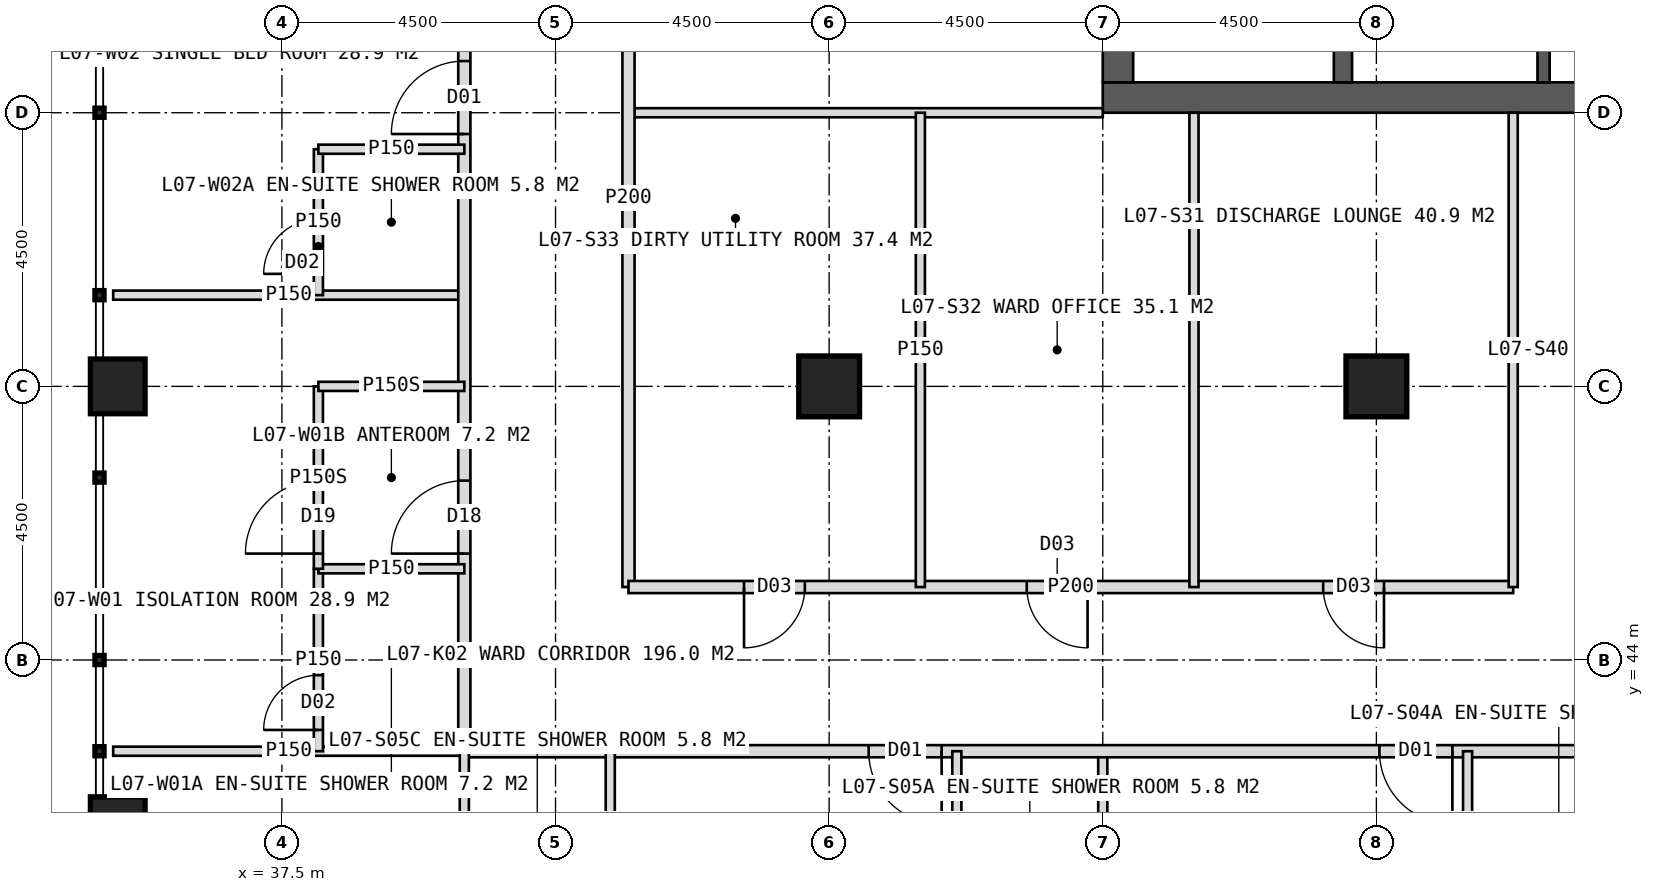
"""IFC4 building model, lengths in metres.
Left out: names, types, materials, properties, quantities, classifications, styles, units other than length and angle.
Written with IfcOpenShell. Run it as: python <this file> out.ifc"""

import sys

from ifc_helpers import new_model, si_unit, direction, frame, frame_2d, origin, origin_2d, place, context, subcontext, project, spatial, rectangle, hollow_rectangle, extrude, element, fill, save


model = new_model("IFC4")
c1 = context("Model", 3, precision=1e-05, world=origin(), true_north=direction((0.0, 1.0)))
c2 = subcontext(c1, "Body", "Model", "MODEL_VIEW")
j1 = project(units=[si_unit("LENGTHUNIT", "METRE"), si_unit("PLANEANGLEUNIT", "RADIAN")], contexts=[c1])
p1 = place(None, origin())
s1 = spatial("IfcSite", under=j1, at=p1, CompositionType="ELEMENT")
p2 = place(p1, origin())
s2 = spatial("IfcBuilding", under=s1, at=p2, CompositionType="ELEMENT")
p3 = place(p2, frame((0.0, 0.0, 35.0)))
s3 = spatial("IfcBuildingStorey", under=s2, at=p3, CompositionType="ELEMENT", Elevation=35.0)
p4 = place(p3, frame((51.0, 53.25, 0.0), z_axis=(0.0, 0.0, 1.0), x_axis=(1.0, 0.0, 0.0)))
e1 = element("IfcWall", 1, at=p4, inside=s3, PredefinedType="SHEAR", context=c2, shape_type="SweptSolid", body=[
    extrude(rectangle(XDim=18.0, YDim=0.5, at=frame_2d((9.0, 0.0))), origin(), (0.0, 0.0, 1.0), 4.0),
])
p5 = place(p4, frame((8.1, 0.0, 0.0)))
e2 = element("IfcOpeningElement", 2, at=p5, cuts=e1, PredefinedType="OPENING", context=c2, shape_type="SweptSolid", body=[
    extrude(rectangle(XDim=1.8, YDim=2.2, at=frame_2d((0.9, 1.1))), frame((0.0, 0.26, 0.0), z_axis=(0.0, -1.0, 0.0), x_axis=(1.0, 0.0, 0.0)), (0.0, 0.0, 1.0), 0.52),
])
p6 = place(p3, frame((51.25, 53.5, 0.0), z_axis=(0.0, 0.0, 1.0), x_axis=(0.0, 1.0, 0.0)))
e3 = element("IfcWall", 3, at=p6, inside=s3, PredefinedType="SHEAR", context=c2, shape_type="SweptSolid", body=[
    extrude(rectangle(XDim=17.0, YDim=0.5, at=frame_2d((8.5, 0.0))), origin(), (0.0, 0.0, 1.0), 4.0),
])
p7 = place(p6, frame((6.0, 0.0, 0.0)))
e4 = element("IfcOpeningElement", 4, at=p7, cuts=e3, PredefinedType="OPENING", context=c2, shape_type="SweptSolid", body=[
    extrude(rectangle(XDim=1.5, YDim=2.2, at=frame_2d((0.75, 1.1))), frame((0.0, 0.26, 0.0), z_axis=(0.0, -1.0, 0.0), x_axis=(1.0, 0.0, 0.0)), (0.0, 0.0, 1.0), 0.52),
])
p8 = place(p3, frame((54.95, 53.5, 0.0), z_axis=(0.0, 0.0, 1.0), x_axis=(0.0, 1.0, 0.0)))
e5 = element("IfcWall", 5, at=p8, inside=s3, PredefinedType="SHEAR", context=c2, shape_type="SweptSolid", body=[
    extrude(rectangle(XDim=17.0, YDim=0.3, at=frame_2d((8.5, 0.0))), origin(), (0.0, 0.0, 1.0), 4.0),
])
p9 = place(p3, frame((58.25, 53.5, 0.0), z_axis=(0.0, 0.0, 1.0), x_axis=(0.0, 1.0, 0.0)))
e6 = element("IfcWall", 6, at=p9, inside=s3, PredefinedType="SHEAR", context=c2, shape_type="SweptSolid", body=[
    extrude(rectangle(XDim=17.0, YDim=0.2, at=frame_2d((8.5, 0.0))), origin(), (0.0, 0.0, 1.0), 4.0),
])
p10 = place(p9, frame((1.375, 0.0, 0.0)))
e7 = element("IfcOpeningElement", 7, at=p10, cuts=e6, PredefinedType="OPENING", context=c2, shape_type="SweptSolid", body=[
    extrude(rectangle(XDim=1.4, YDim=2.2, at=frame_2d((0.7, 1.1))), frame((0.0, 0.11, 0.0), z_axis=(0.0, -1.0, 0.0), x_axis=(1.0, 0.0, 0.0)), (0.0, 0.0, 1.0), 0.22),
])
p11 = place(p9, frame((5.675, 0.0, 0.0)))
e8 = element("IfcOpeningElement", 8, at=p11, cuts=e6, PredefinedType="OPENING", context=c2, shape_type="SweptSolid", body=[
    extrude(rectangle(XDim=1.4, YDim=2.2, at=frame_2d((0.7, 1.1))), frame((0.0, 0.11, 0.0), z_axis=(0.0, -1.0, 0.0), x_axis=(1.0, 0.0, 0.0)), (0.0, 0.0, 1.0), 0.22),
])
for number, where, z_axis, x_axis in (
    (9, (46.5, 48.5, 0.0), (0.0, 0.0, 1.0), (1.0, 0.0, 0.0)),
    (10, (55.5, 48.5, 0.0), (0.0, 0.0, 1.0), (1.0, 0.0, 0.0)),
):
    element("IfcColumn", number, at=place(p3, frame(where, z_axis=z_axis, x_axis=x_axis)), inside=s3, PredefinedType="COLUMN", context=c2, shape_type="SweptSolid", body=[
        extrude(hollow_rectangle(XDim=1.0, YDim=1.0, WallThickness=0.1, at=origin_2d()), origin(), (0.0, 0.0, 1.0), 4.0),
    ])
for number, where, z_axis, x_axis in (
    (11, (34.8, 41.3, 0.0), (0.0, 0.0, 1.0), (1.0, 0.0, 0.0)),
    (12, (34.8, 48.5, 0.0), (0.0, 0.0, 1.0), (1.0, 0.0, 0.0)),
):
    element("IfcColumn", number, at=place(p3, frame(where, z_axis=z_axis, x_axis=x_axis)), inside=s3, PredefinedType="COLUMN", context=c2, shape_type="SweptSolid", body=[
        extrude(hollow_rectangle(XDim=0.9, YDim=0.9, WallThickness=0.08, at=origin_2d()), origin(), (0.0, 0.0, 1.0), 4.0),
    ])
p12 = place(p3, frame((40.5, 50.0, 0.0), z_axis=(0.0, 0.0, 1.0), x_axis=(-1.0, 0.0, 0.0)))
e13 = element("IfcWall", 13, at=p12, inside=s3, PredefinedType="PARTITIONING", context=c2, shape_type="SweptSolid", body=[
    extrude(rectangle(XDim=5.775, YDim=0.15, at=frame_2d((2.887, 0.0))), origin(), (0.0, 0.0, 1.0), 3.75),
])
p13 = place(p3, frame((40.5, 42.5, 0.0), z_axis=(0.0, 0.0, 1.0), x_axis=(0.0, 1.0, 0.0)))
e14 = element("IfcWall", 14, at=p13, inside=s3, PredefinedType="PARTITIONING", context=c2, shape_type="SweptSolid", body=[
    extrude(rectangle(XDim=39.0, YDim=0.2, at=frame_2d((19.5, 0.0))), origin(), (0.0, 0.0, 1.0), 3.75),
])
p14 = place(p13, frame((3.25, 0.0, 0.0)))
e15 = element("IfcOpeningElement", 15, at=p14, cuts=e14, PredefinedType="OPENING", context=c2, shape_type="SweptSolid", body=[
    extrude(rectangle(XDim=1.2, YDim=2.2, at=frame_2d((0.6, 1.1))), frame((0.0, 0.11, 0.0), z_axis=(0.0, -1.0, 0.0), x_axis=(1.0, 0.0, 0.0)), (0.0, 0.0, 1.0), 0.22),
])
p15 = place(p13, frame((10.15, 0.0, 0.0)))
e16 = element("IfcOpeningElement", 16, at=p15, cuts=e14, PredefinedType="OPENING", context=c2, shape_type="SweptSolid", body=[
    extrude(rectangle(XDim=1.2, YDim=2.2, at=frame_2d((0.6, 1.1))), frame((0.0, 0.11, 0.0), z_axis=(0.0, -1.0, 0.0), x_axis=(1.0, 0.0, 0.0)), (0.0, 0.0, 1.0), 0.22),
])
p16 = place(p13, frame((16.15, 0.0, 0.0)))
e17 = element("IfcOpeningElement", 17, at=p16, cuts=e14, PredefinedType="OPENING", context=c2, shape_type="SweptSolid", body=[
    extrude(rectangle(XDim=1.2, YDim=2.2, at=frame_2d((0.6, 1.1))), frame((0.0, 0.11, 0.0), z_axis=(0.0, -1.0, 0.0), x_axis=(1.0, 0.0, 0.0)), (0.0, 0.0, 1.0), 0.22),
])
p17 = place(p13, frame((22.75, 0.0, 0.0)))
e18 = element("IfcOpeningElement", 18, at=p17, cuts=e14, PredefinedType="OPENING", context=c2, shape_type="SweptSolid", body=[
    extrude(rectangle(XDim=1.2, YDim=2.2, at=frame_2d((0.6, 1.1))), frame((0.0, 0.11, 0.0), z_axis=(0.0, -1.0, 0.0), x_axis=(1.0, 0.0, 0.0)), (0.0, 0.0, 1.0), 0.22),
])
p18 = place(p13, frame((31.15, 0.0, 0.0)))
e19 = element("IfcOpeningElement", 19, at=p18, cuts=e14, PredefinedType="OPENING", context=c2, shape_type="SweptSolid", body=[
    extrude(rectangle(XDim=1.2, YDim=2.2, at=frame_2d((0.6, 1.1))), frame((0.0, 0.11, 0.0), z_axis=(0.0, -1.0, 0.0), x_axis=(1.0, 0.0, 0.0)), (0.0, 0.0, 1.0), 0.22),
])
p19 = place(p3, frame((40.5, 42.5, 0.0), z_axis=(0.0, 0.0, 1.0), x_axis=(-1.0, 0.0, 0.0)))
e20 = element("IfcWall", 20, at=p19, inside=s3, PredefinedType="PARTITIONING", context=c2, shape_type="SweptSolid", body=[
    extrude(rectangle(XDim=5.775, YDim=0.15, at=frame_2d((2.887, 0.0))), origin(), (0.0, 0.0, 1.0), 3.75),
])
p20 = place(p3, frame((38.1, 42.5, 0.0), z_axis=(0.0, 0.0, 1.0), x_axis=(0.0, 1.0, 0.0)))
e21 = element("IfcWall", 21, at=p20, inside=s3, PredefinedType="PARTITIONING", context=c2, shape_type="SweptSolid", body=[
    extrude(rectangle(XDim=3.0, YDim=0.15, at=frame_2d((1.5, 0.0))), origin(), (0.0, 0.0, 1.0), 3.75),
])
p21 = place(p20, frame((0.35, 0.0, 0.0)))
e22 = element("IfcOpeningElement", 22, at=p21, cuts=e21, PredefinedType="OPENING", context=c2, shape_type="SweptSolid", body=[
    extrude(rectangle(XDim=0.9, YDim=2.1, at=frame_2d((0.45, 1.05))), frame((0.0, 0.085, 0.0), z_axis=(0.0, -1.0, 0.0), x_axis=(1.0, 0.0, 0.0)), (0.0, 0.0, 1.0), 0.17),
])
p22 = place(p3, frame((40.5, 45.5, 0.0), z_axis=(0.0, 0.0, 1.0), x_axis=(-1.0, 0.0, 0.0)))
e23 = element("IfcWall", 23, at=p22, inside=s3, PredefinedType="PARTITIONING", context=c2, shape_type="SweptSolid", body=[
    extrude(rectangle(XDim=2.4, YDim=0.15, at=frame_2d((1.2, 0.0))), origin(), (0.0, 0.0, 1.0), 3.75),
])
p23 = place(p3, frame((38.1, 45.5, 0.0), z_axis=(0.0, 0.0, 1.0), x_axis=(0.0, 1.0, 0.0)))
e24 = element("IfcWall", 24, at=p23, inside=s3, PredefinedType="PARTITIONING", context=c2, shape_type="SweptSolid", body=[
    extrude(rectangle(XDim=3.0, YDim=0.15, at=frame_2d((1.5, 0.0))), origin(), (0.0, 0.0, 1.0), 3.75),
])
p24 = place(p23, frame((0.25, 0.0, 0.0)))
e25 = element("IfcOpeningElement", 25, at=p24, cuts=e24, PredefinedType="OPENING", context=c2, shape_type="SweptSolid", body=[
    extrude(rectangle(XDim=1.2, YDim=2.2, at=frame_2d((0.6, 1.1))), frame((0.0, 0.085, 0.0), z_axis=(0.0, -1.0, 0.0), x_axis=(1.0, 0.0, 0.0)), (0.0, 0.0, 1.0), 0.17),
])
p25 = place(p3, frame((40.5, 48.5, 0.0), z_axis=(0.0, 0.0, 1.0), x_axis=(-1.0, 0.0, 0.0)))
e26 = element("IfcWall", 26, at=p25, inside=s3, PredefinedType="PARTITIONING", context=c2, shape_type="SweptSolid", body=[
    extrude(rectangle(XDim=2.4, YDim=0.15, at=frame_2d((1.2, 0.0))), origin(), (0.0, 0.0, 1.0), 2.95),
])
p26 = place(p3, frame((38.1, 50.0, 0.0), z_axis=(0.0, 0.0, 1.0), x_axis=(0.0, 1.0, 0.0)))
e27 = element("IfcWall", 27, at=p26, inside=s3, PredefinedType="PARTITIONING", context=c2, shape_type="SweptSolid", body=[
    extrude(rectangle(XDim=2.4, YDim=0.15, at=frame_2d((1.2, 0.0))), origin(), (0.0, 0.0, 1.0), 3.75),
])
p27 = place(p26, frame((0.35, 0.0, 0.0)))
e28 = element("IfcOpeningElement", 28, at=p27, cuts=e27, PredefinedType="OPENING", context=c2, shape_type="SweptSolid", body=[
    extrude(rectangle(XDim=0.9, YDim=2.1, at=frame_2d((0.45, 1.05))), frame((0.0, 0.085, 0.0), z_axis=(0.0, -1.0, 0.0), x_axis=(1.0, 0.0, 0.0)), (0.0, 0.0, 1.0), 0.17),
])
p28 = place(p3, frame((40.5, 52.4, 0.0), z_axis=(0.0, 0.0, 1.0), x_axis=(-1.0, 0.0, 0.0)))
e29 = element("IfcWall", 29, at=p28, inside=s3, PredefinedType="PARTITIONING", context=c2, shape_type="SweptSolid", body=[
    extrude(rectangle(XDim=2.4, YDim=0.15, at=frame_2d((1.2, 0.0))), origin(), (0.0, 0.0, 1.0), 3.75),
])
p29 = place(p3, frame((51.0, 53.0, 0.0), z_axis=(0.0, 0.0, 1.0), x_axis=(-1.0, 0.0, 0.0)))
e30 = element("IfcWall", 30, at=p29, inside=s3, PredefinedType="PARTITIONING", context=c2, shape_type="SweptSolid", body=[
    extrude(rectangle(XDim=7.8, YDim=0.15, at=frame_2d((3.9, 0.0))), origin(), (0.0, 0.0, 1.0), 3.75),
])
p30 = place(p3, frame((43.2, 45.2, 0.0), z_axis=(0.0, 0.0, 1.0), x_axis=(0.0, 1.0, 0.0)))
e31 = element("IfcWall", 31, at=p30, inside=s3, PredefinedType="PARTITIONING", context=c2, shape_type="SweptSolid", body=[
    extrude(rectangle(XDim=12.8, YDim=0.2, at=frame_2d((6.4, 0.0))), origin(), (0.0, 0.0, 1.0), 3.75),
])
p31 = place(p30, frame((9.8, 0.0, 0.0)))
e32 = element("IfcOpeningElement", 32, at=p31, cuts=e31, PredefinedType="OPENING", context=c2, shape_type="SweptSolid", body=[
    extrude(rectangle(XDim=1.0, YDim=2.1, at=frame_2d((0.5, 1.05))), frame((0.0, 0.11, 0.0), z_axis=(0.0, -1.0, 0.0), x_axis=(1.0, 0.0, 0.0)), (0.0, 0.0, 1.0), 0.22),
])
p32 = place(p3, frame((51.0, 42.5, 0.0), z_axis=(0.0, 0.0, 1.0), x_axis=(0.0, -1.0, 0.0)))
e33 = element("IfcWall", 33, at=p32, inside=s3, PredefinedType="PARTITIONING", context=c2, shape_type="SweptSolid", body=[
    extrude(rectangle(XDim=5.775, YDim=0.15, at=frame_2d((2.887, 0.0))), origin(), (0.0, 0.0, 1.0), 3.75),
])
p33 = place(p3, frame((79.5, 42.5, 0.0), z_axis=(0.0, 0.0, 1.0), x_axis=(-1.0, 0.0, 0.0)))
e34 = element("IfcWall", 34, at=p33, inside=s3, PredefinedType="PARTITIONING", context=c2, shape_type="SweptSolid", body=[
    extrude(rectangle(XDim=39.0, YDim=0.2, at=frame_2d((19.5, 0.0))), origin(), (0.0, 0.0, 1.0), 3.75),
])
p34 = place(p33, frame((3.25, 0.0, 0.0)))
e35 = element("IfcOpeningElement", 35, at=p34, cuts=e34, PredefinedType="OPENING", context=c2, shape_type="SweptSolid", body=[
    extrude(rectangle(XDim=1.2, YDim=2.2, at=frame_2d((0.6, 1.1))), frame((0.0, 0.11, 0.0), z_axis=(0.0, -1.0, 0.0), x_axis=(1.0, 0.0, 0.0)), (0.0, 0.0, 1.0), 0.22),
])
p35 = place(p33, frame((10.15, 0.0, 0.0)))
e36 = element("IfcOpeningElement", 36, at=p35, cuts=e34, PredefinedType="OPENING", context=c2, shape_type="SweptSolid", body=[
    extrude(rectangle(XDim=1.2, YDim=2.2, at=frame_2d((0.6, 1.1))), frame((0.0, 0.11, 0.0), z_axis=(0.0, -1.0, 0.0), x_axis=(1.0, 0.0, 0.0)), (0.0, 0.0, 1.0), 0.22),
])
p36 = place(p33, frame((16.15, 0.0, 0.0)))
e37 = element("IfcOpeningElement", 37, at=p36, cuts=e34, PredefinedType="OPENING", context=c2, shape_type="SweptSolid", body=[
    extrude(rectangle(XDim=1.2, YDim=2.2, at=frame_2d((0.6, 1.1))), frame((0.0, 0.11, 0.0), z_axis=(0.0, -1.0, 0.0), x_axis=(1.0, 0.0, 0.0)), (0.0, 0.0, 1.0), 0.22),
])
p37 = place(p33, frame((22.75, 0.0, 0.0)))
e38 = element("IfcOpeningElement", 38, at=p37, cuts=e34, PredefinedType="OPENING", context=c2, shape_type="SweptSolid", body=[
    extrude(rectangle(XDim=1.2, YDim=2.2, at=frame_2d((0.6, 1.1))), frame((0.0, 0.11, 0.0), z_axis=(0.0, -1.0, 0.0), x_axis=(1.0, 0.0, 0.0)), (0.0, 0.0, 1.0), 0.22),
])
p38 = place(p33, frame((31.15, 0.0, 0.0)))
e39 = element("IfcOpeningElement", 39, at=p38, cuts=e34, PredefinedType="OPENING", context=c2, shape_type="SweptSolid", body=[
    extrude(rectangle(XDim=1.2, YDim=2.2, at=frame_2d((0.6, 1.1))), frame((0.0, 0.11, 0.0), z_axis=(0.0, -1.0, 0.0), x_axis=(1.0, 0.0, 0.0)), (0.0, 0.0, 1.0), 0.22),
])
for number, where, z_axis, x_axis in (
    (40, (57.0, 42.5, 0.0), (0.0, 0.0, 1.0), (0.0, -1.0, 0.0)),
    (41, (48.6, 42.5, 0.0), (0.0, 0.0, 1.0), (0.0, -1.0, 0.0)),
    (42, (42.9, 42.5, 0.0), (0.0, 0.0, 1.0), (0.0, -1.0, 0.0)),
    (43, (40.5, 42.5, 0.0), (0.0, 0.0, 1.0), (0.0, -1.0, 0.0)),
):
    element("IfcWall", number, at=place(p3, frame(where, z_axis=z_axis, x_axis=x_axis)), inside=s3, PredefinedType="PARTITIONING", context=c2, shape_type="SweptSolid", body=[
        extrude(rectangle(XDim=2.4, YDim=0.15, at=frame_2d((1.2, 0.0))), origin(), (0.0, 0.0, 1.0), 3.75),
    ])
p39 = place(p3, frame((57.75, 45.2, 0.0), z_axis=(0.0, 0.0, 1.0), x_axis=(-1.0, 0.0, 0.0)))
e44 = element("IfcWall", 44, at=p39, inside=s3, PredefinedType="PARTITIONING", context=c2, shape_type="SweptSolid", body=[
    extrude(rectangle(XDim=14.55, YDim=0.2, at=frame_2d((7.275, 0.0))), origin(), (0.0, 0.0, 1.0), 3.75),
])
p40 = place(p39, frame((2.125, 0.0, 0.0)))
e45 = element("IfcOpeningElement", 45, at=p40, cuts=e44, PredefinedType="OPENING", context=c2, shape_type="SweptSolid", body=[
    extrude(rectangle(XDim=1.0, YDim=2.1, at=frame_2d((0.5, 1.05))), frame((0.0, 0.11, 0.0), z_axis=(0.0, -1.0, 0.0), x_axis=(1.0, 0.0, 0.0)), (0.0, 0.0, 1.0), 0.22),
])
p41 = place(p39, frame((7.0, 0.0, 0.0)))
e46 = element("IfcOpeningElement", 46, at=p41, cuts=e44, PredefinedType="OPENING", context=c2, shape_type="SweptSolid", body=[
    extrude(rectangle(XDim=1.0, YDim=2.1, at=frame_2d((0.5, 1.05))), frame((0.0, 0.11, 0.0), z_axis=(0.0, -1.0, 0.0), x_axis=(1.0, 0.0, 0.0)), (0.0, 0.0, 1.0), 0.22),
])
p42 = place(p39, frame((11.65, 0.0, 0.0)))
e47 = element("IfcOpeningElement", 47, at=p42, cuts=e44, PredefinedType="OPENING", context=c2, shape_type="SweptSolid", body=[
    extrude(rectangle(XDim=1.0, YDim=2.1, at=frame_2d((0.5, 1.05))), frame((0.0, 0.11, 0.0), z_axis=(0.0, -1.0, 0.0), x_axis=(1.0, 0.0, 0.0)), (0.0, 0.0, 1.0), 0.22),
])
for number, where, z_axis, x_axis in (
    (48, (57.75, 53.0, 0.0), (0.0, 0.0, 1.0), (0.0, -1.0, 0.0)),
    (49, (52.5, 53.0, 0.0), (0.0, 0.0, 1.0), (0.0, -1.0, 0.0)),
    (50, (48.0, 53.0, 0.0), (0.0, 0.0, 1.0), (0.0, -1.0, 0.0)),
):
    element("IfcWall", number, at=place(p3, frame(where, z_axis=z_axis, x_axis=x_axis)), inside=s3, PredefinedType="PARTITIONING", context=c2, shape_type="SweptSolid", body=[
        extrude(rectangle(XDim=7.8, YDim=0.15, at=frame_2d((3.9, 0.0))), origin(), (0.0, 0.0, 1.0), 3.75),
    ])
p43 = place(p24, origin())
e51 = element("IfcDoor", 51, at=p43, inside=s3, OperationType="SINGLE_SWING_LEFT", PredefinedType="DOOR", context=c2, shape_type="SweptSolid", body=[
    extrude(rectangle(XDim=1.2, YDim=2.2, at=frame_2d((0.6, 1.1))), frame((0.0, 0.025, 0.0), z_axis=(0.0, -1.0, 0.0), x_axis=(1.0, 0.0, 0.0)), (0.0, 0.0, 1.0), 0.05),
])
fill(e25, e51)
p44 = place(p14, origin())
e52 = element("IfcDoor", 52, at=p44, inside=s3, OperationType="SINGLE_SWING_LEFT", PredefinedType="DOOR", context=c2, shape_type="SweptSolid", body=[
    extrude(rectangle(XDim=1.2, YDim=2.2, at=frame_2d((0.6, 1.1))), frame((0.0, 0.025, 0.0), z_axis=(0.0, -1.0, 0.0), x_axis=(1.0, 0.0, 0.0)), (0.0, 0.0, 1.0), 0.05),
])
fill(e15, e52)
p45 = place(p21, origin())
e53 = element("IfcDoor", 53, at=p45, inside=s3, OperationType="SINGLE_SWING_LEFT", PredefinedType="DOOR", context=c2, shape_type="SweptSolid", body=[
    extrude(rectangle(XDim=0.9, YDim=2.1, at=frame_2d((0.45, 1.05))), frame((0.0, 0.025, 0.0), z_axis=(0.0, -1.0, 0.0), x_axis=(1.0, 0.0, 0.0)), (0.0, 0.0, 1.0), 0.05),
])
fill(e22, e53)
p46 = place(p15, origin())
e54 = element("IfcDoor", 54, at=p46, inside=s3, OperationType="SINGLE_SWING_LEFT", PredefinedType="DOOR", context=c2, shape_type="SweptSolid", body=[
    extrude(rectangle(XDim=1.2, YDim=2.2, at=frame_2d((0.6, 1.1))), frame((0.0, 0.025, 0.0), z_axis=(0.0, -1.0, 0.0), x_axis=(1.0, 0.0, 0.0)), (0.0, 0.0, 1.0), 0.05),
])
fill(e16, e54)
p47 = place(p27, origin())
e55 = element("IfcDoor", 55, at=p47, inside=s3, OperationType="SINGLE_SWING_LEFT", PredefinedType="DOOR", context=c2, shape_type="SweptSolid", body=[
    extrude(rectangle(XDim=0.9, YDim=2.1, at=frame_2d((0.45, 1.05))), frame((0.0, 0.025, 0.0), z_axis=(0.0, -1.0, 0.0), x_axis=(1.0, 0.0, 0.0)), (0.0, 0.0, 1.0), 0.05),
])
fill(e28, e55)
p48 = place(p37, origin())
e56 = element("IfcDoor", 56, at=p48, inside=s3, OperationType="SINGLE_SWING_LEFT", PredefinedType="DOOR", context=c2, shape_type="SweptSolid", body=[
    extrude(rectangle(XDim=1.2, YDim=2.2, at=frame_2d((0.6, 1.1))), frame((0.0, 0.025, 0.0), z_axis=(0.0, -1.0, 0.0), x_axis=(1.0, 0.0, 0.0)), (0.0, 0.0, 1.0), 0.05),
])
fill(e38, e56)
p49 = place(p38, origin())
e57 = element("IfcDoor", 57, at=p49, inside=s3, OperationType="SINGLE_SWING_LEFT", PredefinedType="DOOR", context=c2, shape_type="SweptSolid", body=[
    extrude(rectangle(XDim=1.2, YDim=2.2, at=frame_2d((0.6, 1.1))), frame((0.0, 0.025, 0.0), z_axis=(0.0, -1.0, 0.0), x_axis=(1.0, 0.0, 0.0)), (0.0, 0.0, 1.0), 0.05),
])
fill(e39, e57)
p50 = place(p40, origin())
e58 = element("IfcDoor", 58, at=p50, inside=s3, OperationType="SINGLE_SWING_LEFT", PredefinedType="DOOR", context=c2, shape_type="SweptSolid", body=[
    extrude(rectangle(XDim=1.0, YDim=2.1, at=frame_2d((0.5, 1.05))), frame((0.0, 0.025, 0.0), z_axis=(0.0, -1.0, 0.0), x_axis=(1.0, 0.0, 0.0)), (0.0, 0.0, 1.0), 0.05),
])
fill(e45, e58)
p51 = place(p41, origin())
e59 = element("IfcDoor", 59, at=p51, inside=s3, OperationType="SINGLE_SWING_LEFT", PredefinedType="DOOR", context=c2, shape_type="SweptSolid", body=[
    extrude(rectangle(XDim=1.0, YDim=2.1, at=frame_2d((0.5, 1.05))), frame((0.0, 0.025, 0.0), z_axis=(0.0, -1.0, 0.0), x_axis=(1.0, 0.0, 0.0)), (0.0, 0.0, 1.0), 0.05),
])
fill(e46, e59)
p52 = place(p42, origin())
e60 = element("IfcDoor", 60, at=p52, inside=s3, OperationType="SINGLE_SWING_RIGHT", PredefinedType="DOOR", context=c2, shape_type="SweptSolid", body=[
    extrude(rectangle(XDim=1.0, YDim=2.1, at=frame_2d((0.5, 1.05))), frame((0.0, 0.025, 0.0), z_axis=(0.0, -1.0, 0.0), x_axis=(1.0, 0.0, 0.0)), (0.0, 0.0, 1.0), 0.05),
])
fill(e47, e60)
save(model, sys.argv[1])
